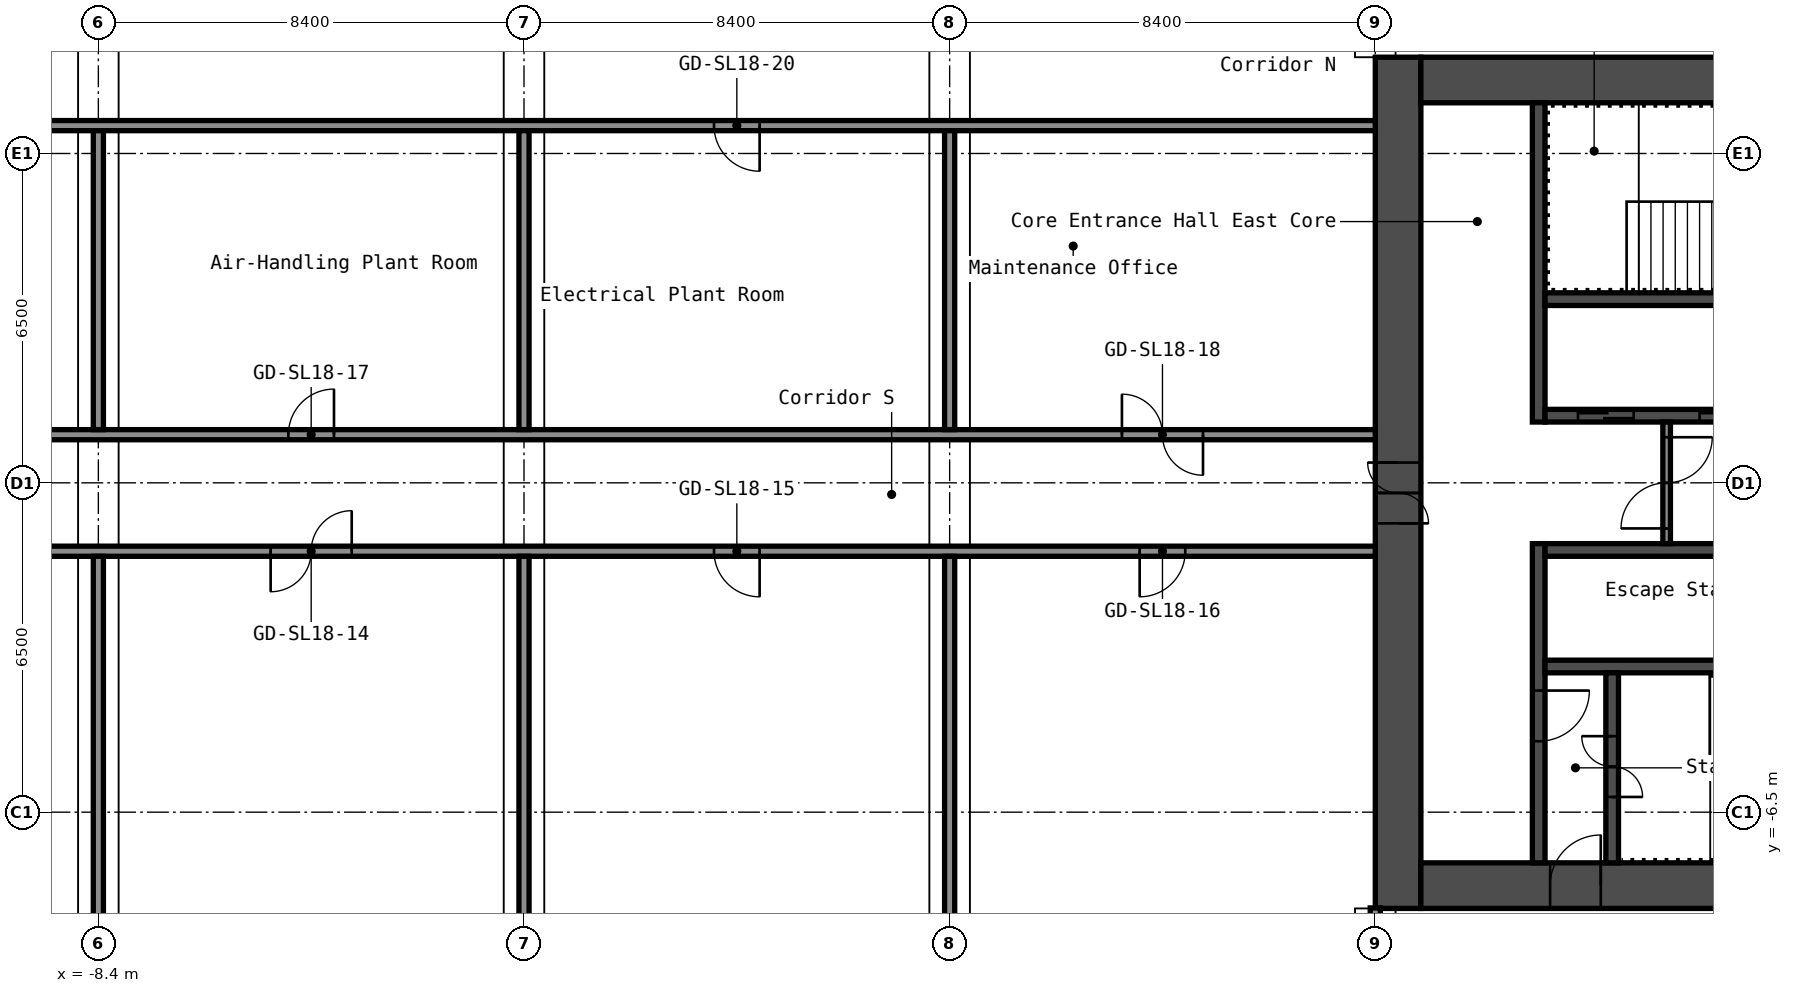
"""IFC4 building model, lengths in metres.
Left out: names, types, materials, properties, quantities, classifications, styles, units other than length and angle.
Written with IfcOpenShell. Run it as: python <this file> out.ifc"""

import sys

from ifc_helpers import new_model, si_unit, direction, frame, frame_2d, origin, place, context, subcontext, project, spatial, rectangle, extrude, element, fill, save


model = new_model("IFC4")
c1 = context("Model", 3, precision=1e-05, world=origin(), true_north=direction((0.0, 1.0)))
c2 = subcontext(c1, "Body", "Model", "MODEL_VIEW")
j1 = project(units=[si_unit("LENGTHUNIT", "METRE"), si_unit("PLANEANGLEUNIT", "RADIAN")], contexts=[c1])
p1 = place(None, origin())
s1 = spatial("IfcSite", under=j1, at=p1, CompositionType="ELEMENT")
p2 = place(p1, origin())
s2 = spatial("IfcBuilding", under=s1, at=p2, CompositionType="ELEMENT")
p3 = place(p2, frame((0.0, 0.0, 64.6)))
s3 = spatial("IfcBuildingStorey", under=s2, at=p3, CompositionType="ELEMENT", Elevation=64.6)
p4 = place(p3, frame((17.25, -8.4, 0.0), z_axis=(0.0, 0.0, 1.0), x_axis=(0.0, 1.0, 0.0)))
e1 = element("IfcWall", 1, at=p4, inside=s3, PredefinedType="SHEAR", context=c2, shape_type="SweptSolid", body=[
    extrude(rectangle(XDim=16.8, YDim=0.9, at=frame_2d((8.4, 0.0))), origin(), (0.0, 0.0, 1.0), 4.1),
])
p5 = place(p4, frame((7.6, 0.0, 0.0)))
e2 = element("IfcOpeningElement", 2, at=p5, cuts=e1, PredefinedType="OPENING", context=c2, shape_type="SweptSolid", body=[
    extrude(rectangle(XDim=1.2, YDim=2.1, at=frame_2d((0.6, 1.05))), frame((0.0, 0.46, 0.0), z_axis=(0.0, -1.0, 0.0), x_axis=(1.0, 0.0, 0.0)), (0.0, 0.0, 1.0), 0.92),
])
p6 = place(p3, frame((17.7, 7.95, 0.0), z_axis=(0.0, 0.0, 1.0), x_axis=(1.0, 0.0, 0.0)))
e3 = element("IfcWall", 3, at=p6, inside=s3, PredefinedType="SHEAR", context=c2, shape_type="SweptSolid", body=[
    extrude(rectangle(XDim=15.0, YDim=0.9, at=frame_2d((7.5, 0.0))), origin(), (0.0, 0.0, 1.0), 4.1),
])
p7 = place(p6, frame((10.4, 0.0, 0.0)))
e4 = element("IfcOpeningElement", 4, at=p7, cuts=e3, PredefinedType="OPENING", context=c2, shape_type="SweptSolid", body=[
    extrude(rectangle(XDim=1.2, YDim=2.1, at=frame_2d((0.6, 1.05))), frame((0.0, 0.46, 0.0), z_axis=(0.0, -1.0, 0.0), x_axis=(1.0, 0.0, 0.0)), (0.0, 0.0, 1.0), 0.92),
])
p8 = place(p6, frame((13.35, 0.0, 0.0)))
e5 = element("IfcOpeningElement", 5, at=p8, cuts=e3, PredefinedType="OPENING", context=c2, shape_type="SweptSolid", body=[
    extrude(rectangle(XDim=0.9, YDim=2.1, at=frame_2d((0.45, 1.05))), frame((0.0, 0.46, 0.0), z_axis=(0.0, -1.0, 0.0), x_axis=(1.0, 0.0, 0.0)), (0.0, 0.0, 1.0), 0.92),
])
p9 = place(p3, frame((17.7, -7.95, 0.0), z_axis=(0.0, 0.0, 1.0), x_axis=(1.0, 0.0, 0.0)))
e6 = element("IfcWall", 6, at=p9, inside=s3, PredefinedType="SHEAR", context=c2, shape_type="SweptSolid", body=[
    extrude(rectangle(XDim=15.0, YDim=0.9, at=frame_2d((7.5, 0.0))), origin(), (0.0, 0.0, 1.0), 4.1),
])
p10 = place(p9, frame((2.55, 0.0, 0.0)))
e7 = element("IfcOpeningElement", 7, at=p10, cuts=e6, PredefinedType="OPENING", context=c2, shape_type="SweptSolid", body=[
    extrude(rectangle(XDim=1.0, YDim=2.1, at=frame_2d((0.5, 1.05))), frame((0.0, 0.46, 0.0), z_axis=(0.0, -1.0, 0.0), x_axis=(1.0, 0.0, 0.0)), (0.0, 0.0, 1.0), 0.92),
])
p11 = place(p3, frame((20.025, 1.2, 0.0), z_axis=(0.0, 0.0, 1.0), x_axis=(0.0, 1.0, 0.0)))
e8 = element("IfcWall", 8, at=p11, inside=s3, PredefinedType="SHEAR", context=c2, shape_type="SweptSolid", body=[
    extrude(rectangle(XDim=6.3, YDim=0.25, at=frame_2d((3.15, 0.0))), origin(), (0.0, 0.0, 1.0), 4.1),
])
p12 = place(p3, frame((20.025, -7.5, 0.0), z_axis=(0.0, 0.0, 1.0), x_axis=(0.0, 1.0, 0.0)))
e9 = element("IfcWall", 9, at=p12, inside=s3, PredefinedType="SHEAR", context=c2, shape_type="SweptSolid", body=[
    extrude(rectangle(XDim=6.3, YDim=0.25, at=frame_2d((3.15, 0.0))), origin(), (0.0, 0.0, 1.0), 4.1),
])
p13 = place(p12, frame((2.4, 0.0, 0.0)))
e10 = element("IfcOpeningElement", 10, at=p13, cuts=e9, PredefinedType="OPENING", context=c2, shape_type="SweptSolid", body=[
    extrude(rectangle(XDim=1.0, YDim=2.1, at=frame_2d((0.5, 1.05))), frame((0.0, 0.135, 0.0), z_axis=(0.0, -1.0, 0.0), x_axis=(1.0, 0.0, 0.0)), (0.0, 0.0, 1.0), 0.27),
])
p14 = place(p3, frame((20.15, 1.325, 0.0), z_axis=(0.0, 0.0, 1.0), x_axis=(1.0, 0.0, 0.0)))
e11 = element("IfcWall", 11, at=p14, inside=s3, PredefinedType="SHEAR", context=c2, shape_type="SweptSolid", body=[
    extrude(rectangle(XDim=7.5, YDim=0.25, at=frame_2d((3.75, 0.0))), origin(), (0.0, 0.0, 1.0), 4.1),
])
p15 = place(p14, frame((0.65, 0.0, 0.0)))
e12 = element("IfcOpeningElement", 12, at=p15, cuts=e11, PredefinedType="OPENING", context=c2, shape_type="SweptSolid", body=[
    extrude(rectangle(XDim=1.1, YDim=2.1, at=frame_2d((0.55, 1.05))), frame((0.0, 0.135, 0.0), z_axis=(0.0, -1.0, 0.0), x_axis=(1.0, 0.0, 0.0)), (0.0, 0.0, 1.0), 0.27),
])
p16 = place(p14, frame((3.05, 0.0, 0.0)))
e13 = element("IfcOpeningElement", 13, at=p16, cuts=e11, PredefinedType="OPENING", context=c2, shape_type="SweptSolid", body=[
    extrude(rectangle(XDim=1.1, YDim=2.1, at=frame_2d((0.55, 1.05))), frame((0.0, 0.135, 0.0), z_axis=(0.0, -1.0, 0.0), x_axis=(1.0, 0.0, 0.0)), (0.0, 0.0, 1.0), 0.27),
])
p17 = place(p14, frame((5.45, 0.0, 0.0)))
e14 = element("IfcOpeningElement", 14, at=p17, cuts=e11, PredefinedType="OPENING", context=c2, shape_type="SweptSolid", body=[
    extrude(rectangle(XDim=1.1, YDim=2.1, at=frame_2d((0.55, 1.05))), frame((0.0, 0.135, 0.0), z_axis=(0.0, -1.0, 0.0), x_axis=(1.0, 0.0, 0.0)), (0.0, 0.0, 1.0), 0.27),
])
for number, where, z_axis, x_axis in (
    (15, (20.15, 3.625, 0.0), (0.0, 0.0, 1.0), (1.0, 0.0, 0.0)),
    (16, (20.15, -1.325, 0.0), (0.0, 0.0, 1.0), (1.0, 0.0, 0.0)),
    (17, (20.15, -3.625, 0.0), (0.0, 0.0, 1.0), (1.0, 0.0, 0.0)),
):
    element("IfcWall", number, at=place(p3, frame(where, z_axis=z_axis, x_axis=x_axis)), inside=s3, PredefinedType="SHEAR", context=c2, shape_type="SweptSolid", body=[
        extrude(rectangle(XDim=7.5, YDim=0.25, at=frame_2d((3.75, 0.0))), origin(), (0.0, 0.0, 1.0), 4.1),
    ])
p18 = place(p3, frame((21.475, -7.5, 0.0), z_axis=(0.0, 0.0, 1.0), x_axis=(0.0, 1.0, 0.0)))
e18 = element("IfcWall", 18, at=p18, inside=s3, PredefinedType="SHEAR", context=c2, shape_type="SweptSolid", body=[
    extrude(rectangle(XDim=3.75, YDim=0.25, at=frame_2d((1.875, 0.0))), origin(), (0.0, 0.0, 1.0), 4.1),
])
p19 = place(p18, frame((1.3, 0.0, 0.0)))
e19 = element("IfcOpeningElement", 19, at=p19, cuts=e18, PredefinedType="OPENING", context=c2, shape_type="SweptSolid", body=[
    extrude(rectangle(XDim=1.2, YDim=2.1, at=frame_2d((0.6, 1.05))), frame((0.0, 0.135, 0.0), z_axis=(0.0, -1.0, 0.0), x_axis=(1.0, 0.0, 0.0)), (0.0, 0.0, 1.0), 0.27),
])
p20 = place(p3, frame((22.55, -1.2, 0.0), z_axis=(0.0, 0.0, 1.0), x_axis=(0.0, 1.0, 0.0)))
e20 = element("IfcWall", 20, at=p20, inside=s3, PredefinedType="PARTITIONING", context=c2, shape_type="SweptSolid", body=[
    extrude(rectangle(XDim=2.4, YDim=0.15, at=frame_2d((1.2, 0.0))), origin(), (0.0, 0.0, 1.0), 4.1),
])
p21 = place(p20, frame((0.3, 0.0, 0.0)))
e21 = element("IfcOpeningElement", 21, at=p21, cuts=e20, PredefinedType="OPENING", context=c2, shape_type="SweptSolid", body=[
    extrude(rectangle(XDim=1.8, YDim=2.1, at=frame_2d((0.9, 1.05))), frame((0.0, 0.085, 0.0), z_axis=(0.0, -1.0, 0.0), x_axis=(1.0, 0.0, 0.0)), (0.0, 0.0, 1.0), 0.17),
])
p22 = place(p3, frame((-16.8, -1.35, 0.0), z_axis=(0.0, 0.0, 1.0), x_axis=(1.0, 0.0, 0.0)))
e22 = element("IfcWall", 22, at=p22, inside=s3, PredefinedType="PARTITIONING", context=c2, shape_type="SweptSolid", body=[
    extrude(rectangle(XDim=33.6, YDim=0.2, at=frame_2d((16.8, 0.0))), origin(), (0.0, 0.0, 1.0), 4.1),
])
p23 = place(p22, frame((3.4, 0.0, 0.0)))
e23 = element("IfcOpeningElement", 23, at=p23, cuts=e22, PredefinedType="OPENING", context=c2, shape_type="SweptSolid", body=[
    extrude(rectangle(XDim=1.6, YDim=2.1, at=frame_2d((0.8, 1.05))), frame((0.0, 0.11, 0.0), z_axis=(0.0, -1.0, 0.0), x_axis=(1.0, 0.0, 0.0)), (0.0, 0.0, 1.0), 0.22),
])
p24 = place(p22, frame((11.8, 0.0, 0.0)))
e24 = element("IfcOpeningElement", 24, at=p24, cuts=e22, PredefinedType="OPENING", context=c2, shape_type="SweptSolid", body=[
    extrude(rectangle(XDim=1.6, YDim=2.1, at=frame_2d((0.8, 1.05))), frame((0.0, 0.11, 0.0), z_axis=(0.0, -1.0, 0.0), x_axis=(1.0, 0.0, 0.0)), (0.0, 0.0, 1.0), 0.22),
])
p25 = place(p22, frame((20.55, 0.0, 0.0)))
e25 = element("IfcOpeningElement", 25, at=p25, cuts=e22, PredefinedType="OPENING", context=c2, shape_type="SweptSolid", body=[
    extrude(rectangle(XDim=0.9, YDim=2.1, at=frame_2d((0.45, 1.05))), frame((0.0, 0.11, 0.0), z_axis=(0.0, -1.0, 0.0), x_axis=(1.0, 0.0, 0.0)), (0.0, 0.0, 1.0), 0.22),
])
p26 = place(p22, frame((28.95, 0.0, 0.0)))
e26 = element("IfcOpeningElement", 26, at=p26, cuts=e22, PredefinedType="OPENING", context=c2, shape_type="SweptSolid", body=[
    extrude(rectangle(XDim=0.9, YDim=2.1, at=frame_2d((0.45, 1.05))), frame((0.0, 0.11, 0.0), z_axis=(0.0, -1.0, 0.0), x_axis=(1.0, 0.0, 0.0)), (0.0, 0.0, 1.0), 0.22),
])
p27 = place(p3, frame((-16.8, 0.95, 0.0), z_axis=(0.0, 0.0, 1.0), x_axis=(1.0, 0.0, 0.0)))
e27 = element("IfcWall", 27, at=p27, inside=s3, PredefinedType="PARTITIONING", context=c2, shape_type="SweptSolid", body=[
    extrude(rectangle(XDim=33.6, YDim=0.2, at=frame_2d((16.8, 0.0))), origin(), (0.0, 0.0, 1.0), 4.1),
])
p28 = place(p27, frame((12.15, 0.0, 0.0)))
e28 = element("IfcOpeningElement", 28, at=p28, cuts=e27, PredefinedType="OPENING", context=c2, shape_type="SweptSolid", body=[
    extrude(rectangle(XDim=0.9, YDim=2.1, at=frame_2d((0.45, 1.05))), frame((0.0, 0.11, 0.0), z_axis=(0.0, -1.0, 0.0), x_axis=(1.0, 0.0, 0.0)), (0.0, 0.0, 1.0), 0.22),
])
p29 = place(p27, frame((28.6, 0.0, 0.0)))
e29 = element("IfcOpeningElement", 29, at=p29, cuts=e27, PredefinedType="OPENING", context=c2, shape_type="SweptSolid", body=[
    extrude(rectangle(XDim=1.6, YDim=2.1, at=frame_2d((0.8, 1.05))), frame((0.0, 0.11, 0.0), z_axis=(0.0, -1.0, 0.0), x_axis=(1.0, 0.0, 0.0)), (0.0, 0.0, 1.0), 0.22),
])
p30 = place(p3, frame((-16.8, 7.05, 0.0), z_axis=(0.0, 0.0, 1.0), x_axis=(1.0, 0.0, 0.0)))
e30 = element("IfcWall", 30, at=p30, inside=s3, PredefinedType="PARTITIONING", context=c2, shape_type="SweptSolid", body=[
    extrude(rectangle(XDim=33.6, YDim=0.2, at=frame_2d((16.8, 0.0))), origin(), (0.0, 0.0, 1.0), 4.1),
])
p31 = place(p30, frame((3.4, 0.0, 0.0)))
e31 = element("IfcOpeningElement", 31, at=p31, cuts=e30, PredefinedType="OPENING", context=c2, shape_type="SweptSolid", body=[
    extrude(rectangle(XDim=1.6, YDim=2.1, at=frame_2d((0.8, 1.05))), frame((0.0, 0.11, 0.0), z_axis=(0.0, -1.0, 0.0), x_axis=(1.0, 0.0, 0.0)), (0.0, 0.0, 1.0), 0.22),
])
p32 = place(p30, frame((20.55, 0.0, 0.0)))
e32 = element("IfcOpeningElement", 32, at=p32, cuts=e30, PredefinedType="OPENING", context=c2, shape_type="SweptSolid", body=[
    extrude(rectangle(XDim=0.9, YDim=2.1, at=frame_2d((0.45, 1.05))), frame((0.0, 0.11, 0.0), z_axis=(0.0, -1.0, 0.0), x_axis=(1.0, 0.0, 0.0)), (0.0, 0.0, 1.0), 0.22),
])
p33 = place(p3, frame((-8.4, -20.3, 0.0), z_axis=(0.0, 0.0, 1.0), x_axis=(0.0, 1.0, 0.0)))
e33 = element("IfcWall", 33, at=p33, inside=s3, PredefinedType="PARTITIONING", context=c2, shape_type="SweptSolid", body=[
    extrude(rectangle(XDim=18.85, YDim=0.2, at=frame_2d((9.425, 0.0))), origin(), (0.0, 0.0, 1.0), 4.1),
])
p34 = place(p3, frame((-8.4, 1.05, 0.0), z_axis=(0.0, 0.0, 1.0), x_axis=(0.0, 1.0, 0.0)))
e34 = element("IfcWall", 34, at=p34, inside=s3, PredefinedType="PARTITIONING", context=c2, shape_type="SweptSolid", body=[
    extrude(rectangle(XDim=5.9, YDim=0.2, at=frame_2d((2.95, 0.0))), origin(), (0.0, 0.0, 1.0), 4.1),
])
p35 = place(p3, frame((0.0, -20.3, 0.0), z_axis=(0.0, 0.0, 1.0), x_axis=(0.0, 1.0, 0.0)))
e35 = element("IfcWall", 35, at=p35, inside=s3, PredefinedType="PARTITIONING", context=c2, shape_type="SweptSolid", body=[
    extrude(rectangle(XDim=18.85, YDim=0.2, at=frame_2d((9.425, 0.0))), origin(), (0.0, 0.0, 1.0), 4.1),
])
p36 = place(p3, frame((0.0, 1.05, 0.0), z_axis=(0.0, 0.0, 1.0), x_axis=(0.0, 1.0, 0.0)))
e36 = element("IfcWall", 36, at=p36, inside=s3, PredefinedType="PARTITIONING", context=c2, shape_type="SweptSolid", body=[
    extrude(rectangle(XDim=5.9, YDim=0.2, at=frame_2d((2.95, 0.0))), origin(), (0.0, 0.0, 1.0), 4.1),
])
p37 = place(p3, frame((8.4, -20.3, 0.0), z_axis=(0.0, 0.0, 1.0), x_axis=(0.0, 1.0, 0.0)))
e37 = element("IfcWall", 37, at=p37, inside=s3, PredefinedType="PARTITIONING", context=c2, shape_type="SweptSolid", body=[
    extrude(rectangle(XDim=18.85, YDim=0.2, at=frame_2d((9.425, 0.0))), origin(), (0.0, 0.0, 1.0), 4.1),
])
p38 = place(p3, frame((8.4, 1.05, 0.0), z_axis=(0.0, 0.0, 1.0), x_axis=(0.0, 1.0, 0.0)))
e38 = element("IfcWall", 38, at=p38, inside=s3, PredefinedType="PARTITIONING", context=c2, shape_type="SweptSolid", body=[
    extrude(rectangle(XDim=5.9, YDim=0.2, at=frame_2d((2.95, 0.0))), origin(), (0.0, 0.0, 1.0), 4.1),
])
p39 = place(p3, frame((16.8, -20.3, 0.0), z_axis=(0.0, 0.0, 1.0), x_axis=(0.0, 1.0, 0.0)))
e39 = element("IfcWall", 39, at=p39, inside=s3, PredefinedType="PARTITIONING", context=c2, shape_type="SweptSolid", body=[
    extrude(rectangle(XDim=11.91, YDim=0.2, at=frame_2d((5.955, 0.0))), origin(), (0.0, 0.0, 1.0), 4.1),
])
p40 = place(p5, origin())
e40 = element("IfcDoor", 40, at=p40, inside=s3, OperationType="DOUBLE_DOOR_SINGLE_SWING", PredefinedType="DOOR", context=c2, shape_type="SweptSolid", body=[
    extrude(rectangle(XDim=1.2, YDim=2.1, at=frame_2d((0.6, 1.05))), frame((0.0, 0.025, 0.0), z_axis=(0.0, -1.0, 0.0), x_axis=(1.0, 0.0, 0.0)), (0.0, 0.0, 1.0), 0.05),
])
fill(e2, e40)
p41 = place(p10, origin())
e41 = element("IfcDoor", 41, at=p41, inside=s3, OperationType="SINGLE_SWING_LEFT", PredefinedType="DOOR", context=c2, shape_type="SweptSolid", body=[
    extrude(rectangle(XDim=1.0, YDim=2.1, at=frame_2d((0.5, 1.05))), frame((0.0, 0.025, 0.0), z_axis=(0.0, -1.0, 0.0), x_axis=(1.0, 0.0, 0.0)), (0.0, 0.0, 1.0), 0.05),
])
fill(e7, e41)
p42 = place(p19, origin())
e42 = element("IfcDoor", 42, at=p42, inside=s3, OperationType="DOUBLE_DOOR_SINGLE_SWING", PredefinedType="DOOR", context=c2, shape_type="SweptSolid", body=[
    extrude(rectangle(XDim=1.2, YDim=2.1, at=frame_2d((0.6, 1.05))), frame((0.0, 0.025, 0.0), z_axis=(0.0, -1.0, 0.0), x_axis=(1.0, 0.0, 0.0)), (0.0, 0.0, 1.0), 0.05),
])
fill(e19, e42)
p43 = place(p13, origin())
e43 = element("IfcDoor", 43, at=p43, inside=s3, OperationType="SINGLE_SWING_RIGHT", PredefinedType="DOOR", context=c2, shape_type="SweptSolid", body=[
    extrude(rectangle(XDim=1.0, YDim=2.1, at=frame_2d((0.5, 1.05))), frame((0.0, 0.025, 0.0), z_axis=(0.0, -1.0, 0.0), x_axis=(1.0, 0.0, 0.0)), (0.0, 0.0, 1.0), 0.05),
])
fill(e10, e43)
p44 = place(p21, origin())
e44 = element("IfcDoor", 44, at=p44, inside=s3, OperationType="DOUBLE_DOOR_SINGLE_SWING", PredefinedType="DOOR", context=c2, shape_type="SweptSolid", body=[
    extrude(rectangle(XDim=1.8, YDim=2.1, at=frame_2d((0.9, 1.05))), frame((0.0, 0.025, 0.0), z_axis=(0.0, -1.0, 0.0), x_axis=(1.0, 0.0, 0.0)), (0.0, 0.0, 1.0), 0.05),
])
fill(e21, e44)
p45 = place(p15, origin())
e45 = element("IfcDoor", 45, at=p45, inside=s3, OperationType="DOUBLE_DOOR_SLIDING", PredefinedType="DOOR", context=c2, shape_type="SweptSolid", body=[
    extrude(rectangle(XDim=1.1, YDim=2.1, at=frame_2d((0.55, 1.05))), frame((0.0, 0.025, 0.0), z_axis=(0.0, -1.0, 0.0), x_axis=(1.0, 0.0, 0.0)), (0.0, 0.0, 1.0), 0.05),
])
fill(e12, e45)
p46 = place(p16, origin())
e46 = element("IfcDoor", 46, at=p46, inside=s3, OperationType="DOUBLE_DOOR_SLIDING", PredefinedType="DOOR", context=c2, shape_type="SweptSolid", body=[
    extrude(rectangle(XDim=1.1, YDim=2.1, at=frame_2d((0.55, 1.05))), frame((0.0, 0.025, 0.0), z_axis=(0.0, -1.0, 0.0), x_axis=(1.0, 0.0, 0.0)), (0.0, 0.0, 1.0), 0.05),
])
fill(e13, e46)
p47 = place(p24, origin())
e47 = element("IfcDoor", 47, at=p47, inside=s3, OperationType="DOUBLE_DOOR_SINGLE_SWING", PredefinedType="DOOR", context=c2, shape_type="SweptSolid", body=[
    extrude(rectangle(XDim=1.6, YDim=2.1, at=frame_2d((0.8, 1.05))), frame((0.0, 0.025, 0.0), z_axis=(0.0, -1.0, 0.0), x_axis=(1.0, 0.0, 0.0)), (0.0, 0.0, 1.0), 0.05),
])
fill(e24, e47)
p48 = place(p25, origin())
e48 = element("IfcDoor", 48, at=p48, inside=s3, OperationType="SINGLE_SWING_RIGHT", PredefinedType="DOOR", context=c2, shape_type="SweptSolid", body=[
    extrude(rectangle(XDim=0.9, YDim=2.1, at=frame_2d((0.45, 1.05))), frame((0.0, 0.025, 0.0), z_axis=(0.0, -1.0, 0.0), x_axis=(1.0, 0.0, 0.0)), (0.0, 0.0, 1.0), 0.05),
])
fill(e25, e48)
p49 = place(p26, origin())
e49 = element("IfcDoor", 49, at=p49, inside=s3, OperationType="SINGLE_SWING_LEFT", PredefinedType="DOOR", context=c2, shape_type="SweptSolid", body=[
    extrude(rectangle(XDim=0.9, YDim=2.1, at=frame_2d((0.45, 1.05))), frame((0.0, 0.025, 0.0), z_axis=(0.0, -1.0, 0.0), x_axis=(1.0, 0.0, 0.0)), (0.0, 0.0, 1.0), 0.05),
])
fill(e26, e49)
p50 = place(p28, origin())
e50 = element("IfcDoor", 50, at=p50, inside=s3, OperationType="SINGLE_SWING_LEFT", PredefinedType="DOOR", context=c2, shape_type="SweptSolid", body=[
    extrude(rectangle(XDim=0.9, YDim=2.1, at=frame_2d((0.45, 1.05))), frame((0.0, 0.025, 0.0), z_axis=(0.0, -1.0, 0.0), x_axis=(1.0, 0.0, 0.0)), (0.0, 0.0, 1.0), 0.05),
])
fill(e28, e50)
p51 = place(p29, origin())
e51 = element("IfcDoor", 51, at=p51, inside=s3, OperationType="DOUBLE_DOOR_SINGLE_SWING", PredefinedType="DOOR", context=c2, shape_type="SweptSolid", body=[
    extrude(rectangle(XDim=1.6, YDim=2.1, at=frame_2d((0.8, 1.05))), frame((0.0, 0.025, 0.0), z_axis=(0.0, -1.0, 0.0), x_axis=(1.0, 0.0, 0.0)), (0.0, 0.0, 1.0), 0.05),
])
fill(e29, e51)
p52 = place(p32, origin())
e52 = element("IfcDoor", 52, at=p52, inside=s3, OperationType="SINGLE_SWING_RIGHT", PredefinedType="DOOR", context=c2, shape_type="SweptSolid", body=[
    extrude(rectangle(XDim=0.9, YDim=2.1, at=frame_2d((0.45, 1.05))), frame((0.0, 0.025, 0.0), z_axis=(0.0, -1.0, 0.0), x_axis=(1.0, 0.0, 0.0)), (0.0, 0.0, 1.0), 0.05),
])
fill(e32, e52)
save(model, sys.argv[1])
